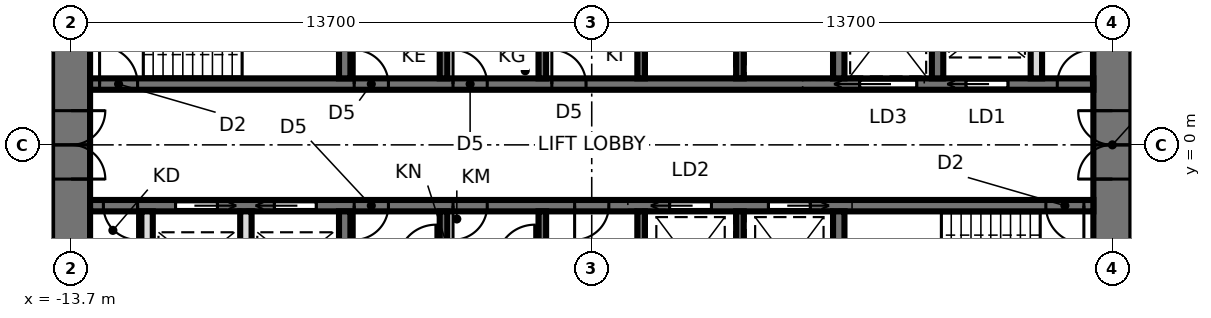
"""IFC4 building model, lengths in metres.
Left out: names, types, materials, properties, quantities, classifications, styles, units other than length and angle.
Written with IfcOpenShell. Run it as: python <this file> out.ifc"""

import sys

from ifc_helpers import new_model, si_unit, direction, frame, frame_2d, origin, place, context, subcontext, project, spatial, rectangle, extrude, element, fill, save


model = new_model("IFC4")
c1 = context("Model", 3, precision=1e-05, world=origin(), true_north=direction((0.0, 1.0)))
c2 = subcontext(c1, "Body", "Model", "MODEL_VIEW")
j1 = project(units=[si_unit("LENGTHUNIT", "METRE"), si_unit("PLANEANGLEUNIT", "RADIAN")], contexts=[c1])
p1 = place(None, origin())
s1 = spatial("IfcSite", under=j1, at=p1, CompositionType="ELEMENT")
p2 = place(p1, origin())
s2 = spatial("IfcBuilding", under=s1, at=p2, CompositionType="ELEMENT")
p3 = place(p2, frame((0.0, 0.0, 207.2)))
s3 = spatial("IfcBuildingStorey", under=s2, at=p3, CompositionType="ELEMENT", Elevation=207.2)
p4 = place(p3, frame((13.7, -9.5, 0.0), z_axis=(0.0, 0.0, 1.0), x_axis=(0.0, 1.0, 0.0)))
e1 = element("IfcWall", 1, at=p4, inside=s3, PredefinedType="SHEAR", context=c2, shape_type="SweptSolid", body=[
    extrude(rectangle(XDim=19.0, YDim=1.0, at=frame_2d((9.5, 0.0))), origin(), (0.0, 0.0, 1.0), 3.9),
])
p5 = place(p4, frame((8.6, 0.0, 0.0)))
e2 = element("IfcOpeningElement", 2, at=p5, cuts=e1, PredefinedType="OPENING", context=c2, shape_type="SweptSolid", body=[
    extrude(rectangle(XDim=1.8, YDim=2.4, at=frame_2d((0.9, 1.2))), frame((0.0, 0.51, 0.0), z_axis=(0.0, -1.0, 0.0), x_axis=(1.0, 0.0, 0.0)), (0.0, 0.0, 1.0), 1.02),
])
p6 = place(p3, frame((-13.7, 9.5, 0.0), z_axis=(0.0, 0.0, 1.0), x_axis=(0.0, -1.0, 0.0)))
e3 = element("IfcWall", 3, at=p6, inside=s3, PredefinedType="SHEAR", context=c2, shape_type="SweptSolid", body=[
    extrude(rectangle(XDim=19.0, YDim=1.0, at=frame_2d((9.5, 0.0))), origin(), (0.0, 0.0, 1.0), 3.9),
])
p7 = place(p6, frame((8.6, 0.0, 0.0)))
e4 = element("IfcOpeningElement", 4, at=p7, cuts=e3, PredefinedType="OPENING", context=c2, shape_type="SweptSolid", body=[
    extrude(rectangle(XDim=1.8, YDim=2.4, at=frame_2d((0.9, 1.2))), frame((0.0, 0.51, 0.0), z_axis=(0.0, -1.0, 0.0), x_axis=(1.0, 0.0, 0.0)), (0.0, 0.0, 1.0), 1.02),
])
p8 = place(p3, frame((-13.2, 1.6, 0.0), z_axis=(0.0, 0.0, 1.0), x_axis=(1.0, 0.0, 0.0)))
e5 = element("IfcWall", 5, at=p8, inside=s3, PredefinedType="SHEAR", context=c2, shape_type="SweptSolid", body=[
    extrude(rectangle(XDim=26.4, YDim=0.3, at=frame_2d((13.2, 0.0))), origin(), (0.0, 0.0, 1.0), 3.9),
])
p9 = place(p8, frame((0.25, 0.0, 0.0)))
e6 = element("IfcOpeningElement", 6, at=p9, cuts=e5, PredefinedType="OPENING", context=c2, shape_type="SweptSolid", body=[
    extrude(rectangle(XDim=1.0, YDim=2.1, at=frame_2d((0.5, 1.05))), frame((0.0, 0.16, 0.0), z_axis=(0.0, -1.0, 0.0), x_axis=(1.0, 0.0, 0.0)), (0.0, 0.0, 1.0), 0.32),
])
p10 = place(p8, frame((23.05, 0.0, 0.0)))
e7 = element("IfcOpeningElement", 7, at=p10, cuts=e5, PredefinedType="OPENING", context=c2, shape_type="SweptSolid", body=[
    extrude(rectangle(XDim=1.1, YDim=2.3, at=frame_2d((0.55, 1.15))), frame((0.0, 0.16, 0.0), z_axis=(0.0, -1.0, 0.0), x_axis=(1.0, 0.0, 0.0)), (0.0, 0.0, 1.0), 0.32),
])
p11 = place(p8, frame((20.25, 0.0, 0.0)))
e8 = element("IfcOpeningElement", 8, at=p11, cuts=e5, PredefinedType="OPENING", context=c2, shape_type="SweptSolid", body=[
    extrude(rectangle(XDim=1.5, YDim=2.4, at=frame_2d((0.75, 1.2))), frame((0.0, 0.16, 0.0), z_axis=(0.0, -1.0, 0.0), x_axis=(1.0, 0.0, 0.0)), (0.0, 0.0, 1.0), 0.32),
])
p12 = place(p8, frame((6.95, 0.0, 0.0)))
e9 = element("IfcOpeningElement", 9, at=p12, cuts=e5, PredefinedType="OPENING", context=c2, shape_type="SweptSolid", body=[
    extrude(rectangle(XDim=0.9, YDim=2.1, at=frame_2d((0.45, 1.05))), frame((0.0, 0.16, 0.0), z_axis=(0.0, -1.0, 0.0), x_axis=(1.0, 0.0, 0.0)), (0.0, 0.0, 1.0), 0.32),
])
p13 = place(p8, frame((9.55, 0.0, 0.0)))
e10 = element("IfcOpeningElement", 10, at=p13, cuts=e5, PredefinedType="OPENING", context=c2, shape_type="SweptSolid", body=[
    extrude(rectangle(XDim=0.9, YDim=2.1, at=frame_2d((0.45, 1.05))), frame((0.0, 0.16, 0.0), z_axis=(0.0, -1.0, 0.0), x_axis=(1.0, 0.0, 0.0)), (0.0, 0.0, 1.0), 0.32),
])
p14 = place(p8, frame((12.15, 0.0, 0.0)))
e11 = element("IfcOpeningElement", 11, at=p14, cuts=e5, PredefinedType="OPENING", context=c2, shape_type="SweptSolid", body=[
    extrude(rectangle(XDim=0.9, YDim=2.1, at=frame_2d((0.45, 1.05))), frame((0.0, 0.16, 0.0), z_axis=(0.0, -1.0, 0.0), x_axis=(1.0, 0.0, 0.0)), (0.0, 0.0, 1.0), 0.32),
])
p15 = place(p8, frame((25.45, 0.0, 0.0)))
e12 = element("IfcOpeningElement", 12, at=p15, cuts=e5, PredefinedType="OPENING", context=c2, shape_type="SweptSolid", body=[
    extrude(rectangle(XDim=0.9, YDim=2.1, at=frame_2d((0.45, 1.05))), frame((0.0, 0.16, 0.0), z_axis=(0.0, -1.0, 0.0), x_axis=(1.0, 0.0, 0.0)), (0.0, 0.0, 1.0), 0.32),
])
p16 = place(p3, frame((-13.2, -1.6, 0.0), z_axis=(0.0, 0.0, 1.0), x_axis=(1.0, 0.0, 0.0)))
e13 = element("IfcWall", 13, at=p16, inside=s3, PredefinedType="SHEAR", context=c2, shape_type="SweptSolid", body=[
    extrude(rectangle(XDim=26.4, YDim=0.3, at=frame_2d((13.2, 0.0))), origin(), (0.0, 0.0, 1.0), 3.9),
])
p17 = place(p16, frame((25.15, 0.0, 0.0)))
e14 = element("IfcOpeningElement", 14, at=p17, cuts=e13, PredefinedType="OPENING", context=c2, shape_type="SweptSolid", body=[
    extrude(rectangle(XDim=1.0, YDim=2.1, at=frame_2d((0.5, 1.05))), frame((0.0, 0.16, 0.0), z_axis=(0.0, -1.0, 0.0), x_axis=(1.0, 0.0, 0.0)), (0.0, 0.0, 1.0), 0.32),
])
p18 = place(p16, frame((6.95, 0.0, 0.0)))
e15 = element("IfcOpeningElement", 15, at=p18, cuts=e13, PredefinedType="OPENING", context=c2, shape_type="SweptSolid", body=[
    extrude(rectangle(XDim=0.9, YDim=2.1, at=frame_2d((0.45, 1.05))), frame((0.0, 0.16, 0.0), z_axis=(0.0, -1.0, 0.0), x_axis=(1.0, 0.0, 0.0)), (0.0, 0.0, 1.0), 0.32),
])
p19 = place(p16, frame((9.55, 0.0, 0.0)))
e16 = element("IfcOpeningElement", 16, at=p19, cuts=e13, PredefinedType="OPENING", context=c2, shape_type="SweptSolid", body=[
    extrude(rectangle(XDim=0.9, YDim=2.1, at=frame_2d((0.45, 1.05))), frame((0.0, 0.16, 0.0), z_axis=(0.0, -1.0, 0.0), x_axis=(1.0, 0.0, 0.0)), (0.0, 0.0, 1.0), 0.32),
])
p20 = place(p16, frame((12.75, 0.0, 0.0)))
e17 = element("IfcOpeningElement", 17, at=p20, cuts=e13, PredefinedType="OPENING", context=c2, shape_type="SweptSolid", body=[
    extrude(rectangle(XDim=0.9, YDim=2.1, at=frame_2d((0.45, 1.05))), frame((0.0, 0.16, 0.0), z_axis=(0.0, -1.0, 0.0), x_axis=(1.0, 0.0, 0.0)), (0.0, 0.0, 1.0), 0.32),
])
p21 = place(p16, frame((15.25, 0.0, 0.0)))
e18 = element("IfcOpeningElement", 18, at=p21, cuts=e13, PredefinedType="OPENING", context=c2, shape_type="SweptSolid", body=[
    extrude(rectangle(XDim=1.1, YDim=2.3, at=frame_2d((0.55, 1.15))), frame((0.0, 0.16, 0.0), z_axis=(0.0, -1.0, 0.0), x_axis=(1.0, 0.0, 0.0)), (0.0, 0.0, 1.0), 0.32),
])
p22 = place(p16, frame((17.85, 0.0, 0.0)))
e19 = element("IfcOpeningElement", 19, at=p22, cuts=e13, PredefinedType="OPENING", context=c2, shape_type="SweptSolid", body=[
    extrude(rectangle(XDim=1.1, YDim=2.3, at=frame_2d((0.55, 1.15))), frame((0.0, 0.16, 0.0), z_axis=(0.0, -1.0, 0.0), x_axis=(1.0, 0.0, 0.0)), (0.0, 0.0, 1.0), 0.32),
])
p23 = place(p16, frame((4.85, 0.0, 0.0)))
e20 = element("IfcOpeningElement", 20, at=p23, cuts=e13, PredefinedType="OPENING", context=c2, shape_type="SweptSolid", body=[
    extrude(rectangle(XDim=1.1, YDim=2.3, at=frame_2d((0.55, 1.15))), frame((0.0, 0.16, 0.0), z_axis=(0.0, -1.0, 0.0), x_axis=(1.0, 0.0, 0.0)), (0.0, 0.0, 1.0), 0.32),
])
p24 = place(p16, frame((2.25, 0.0, 0.0)))
e21 = element("IfcOpeningElement", 21, at=p24, cuts=e13, PredefinedType="OPENING", context=c2, shape_type="SweptSolid", body=[
    extrude(rectangle(XDim=1.1, YDim=2.3, at=frame_2d((0.55, 1.15))), frame((0.0, 0.16, 0.0), z_axis=(0.0, -1.0, 0.0), x_axis=(1.0, 0.0, 0.0)), (0.0, 0.0, 1.0), 0.32),
])
p25 = place(p16, frame((0.35, 0.0, 0.0)))
e22 = element("IfcOpeningElement", 22, at=p25, cuts=e13, PredefinedType="OPENING", context=c2, shape_type="SweptSolid", body=[
    extrude(rectangle(XDim=0.9, YDim=2.1, at=frame_2d((0.45, 1.05))), frame((0.0, 0.16, 0.0), z_axis=(0.0, -1.0, 0.0), x_axis=(1.0, 0.0, 0.0)), (0.0, 0.0, 1.0), 0.32),
])
for number, where, z_axis, x_axis in (
    (23, (-6.5, 1.75, 0.0), (0.0, 0.0, 1.0), (0.0, 1.0, 0.0)),
    (24, (6.5, 1.75, 0.0), (0.0, 0.0, 1.0), (0.0, 1.0, 0.0)),
):
    element("IfcWall", number, at=place(p3, frame(where, z_axis=z_axis, x_axis=x_axis)), inside=s3, PredefinedType="SHEAR", context=c2, shape_type="SweptSolid", body=[
        extrude(rectangle(XDim=2.7, YDim=0.3, at=frame_2d((1.35, 0.0))), origin(), (0.0, 0.0, 1.0), 3.9),
    ])
for number, where, z_axis, x_axis in (
    (25, (-3.9, 1.75, 0.0), (0.0, 0.0, 1.0), (0.0, 1.0, 0.0)),
    (26, (-1.3, 1.75, 0.0), (0.0, 0.0, 1.0), (0.0, 1.0, 0.0)),
    (27, (1.3, 1.75, 0.0), (0.0, 0.0, 1.0), (0.0, 1.0, 0.0)),
    (28, (3.9, 1.75, 0.0), (0.0, 0.0, 1.0), (0.0, 1.0, 0.0)),
):
    element("IfcWall", number, at=place(p3, frame(where, z_axis=z_axis, x_axis=x_axis)), inside=s3, PredefinedType="SHEAR", context=c2, shape_type="SweptSolid", body=[
        extrude(rectangle(XDim=2.7, YDim=0.2, at=frame_2d((1.35, 0.0))), origin(), (0.0, 0.0, 1.0), 3.9),
    ])
for number, where, z_axis, x_axis in (
    (29, (-6.5, -1.75, 0.0), (0.0, 0.0, 1.0), (0.0, -1.0, 0.0)),
    (30, (6.5, -1.75, 0.0), (0.0, 0.0, 1.0), (0.0, -1.0, 0.0)),
):
    element("IfcWall", number, at=place(p3, frame(where, z_axis=z_axis, x_axis=x_axis)), inside=s3, PredefinedType="SHEAR", context=c2, shape_type="SweptSolid", body=[
        extrude(rectangle(XDim=2.7, YDim=0.3, at=frame_2d((1.35, 0.0))), origin(), (0.0, 0.0, 1.0), 3.9),
    ])
for number, where, z_axis, x_axis in (
    (31, (-3.9, -1.75, 0.0), (0.0, 0.0, 1.0), (0.0, -1.0, 0.0)),
    (32, (-1.3, -1.75, 0.0), (0.0, 0.0, 1.0), (0.0, -1.0, 0.0)),
    (33, (1.3, -1.75, 0.0), (0.0, 0.0, 1.0), (0.0, -1.0, 0.0)),
    (34, (3.9, -1.75, 0.0), (0.0, 0.0, 1.0), (0.0, -1.0, 0.0)),
):
    element("IfcWall", number, at=place(p3, frame(where, z_axis=z_axis, x_axis=x_axis)), inside=s3, PredefinedType="SHEAR", context=c2, shape_type="SweptSolid", body=[
        extrude(rectangle(XDim=2.7, YDim=0.2, at=frame_2d((1.35, 0.0))), origin(), (0.0, 0.0, 1.0), 3.9),
    ])
p26 = place(p3, frame((9.1, 1.75, 0.0), z_axis=(0.0, 0.0, 1.0), x_axis=(0.0, 1.0, 0.0)))
e35 = element("IfcWall", 35, at=p26, inside=s3, PredefinedType="SHEAR", context=c2, shape_type="SweptSolid", body=[
    extrude(rectangle(XDim=2.7, YDim=0.3, at=frame_2d((1.35, 0.0))), origin(), (0.0, 0.0, 1.0), 3.9),
])
for number, where, z_axis, x_axis in (
    (36, (-9.1, -1.75, 0.0), (0.0, 0.0, 1.0), (0.0, -1.0, 0.0)),
    (37, (-11.7, -1.75, 0.0), (0.0, 0.0, 1.0), (0.0, -1.0, 0.0)),
    (38, (11.7, 1.75, 0.0), (0.0, 0.0, 1.0), (0.0, 1.0, 0.0)),
):
    element("IfcWall", number, at=place(p3, frame(where, z_axis=z_axis, x_axis=x_axis)), inside=s3, PredefinedType="SOLIDWALL", context=c2, shape_type="SweptSolid", body=[
        extrude(rectangle(XDim=2.7, YDim=0.3, at=frame_2d((1.35, 0.0))), origin(), (0.0, 0.0, 1.0), 3.74),
    ])
p27 = place(p7, origin())
e39 = element("IfcDoor", 39, at=p27, inside=s3, OperationType="DOUBLE_DOOR_SINGLE_SWING", PredefinedType="DOOR", context=c2, shape_type="SweptSolid", body=[
    extrude(rectangle(XDim=1.72, YDim=2.36, at=frame_2d((0.9, 1.18))), frame((0.0, 0.025, 0.0), z_axis=(0.0, -1.0, 0.0), x_axis=(1.0, 0.0, 0.0)), (0.0, 0.0, 1.0), 0.05),
    extrude(rectangle(XDim=0.04, YDim=2.4, at=frame_2d((0.02, 1.2))), frame((0.0, 0.25, 0.0), z_axis=(0.0, -1.0, 0.0), x_axis=(1.0, 0.0, 0.0)), (0.0, 0.0, 1.0), 0.5),
    extrude(rectangle(XDim=0.04, YDim=2.4, at=frame_2d((1.78, 1.2))), frame((0.0, 0.25, 0.0), z_axis=(0.0, -1.0, 0.0), x_axis=(1.0, 0.0, 0.0)), (0.0, 0.0, 1.0), 0.5),
    extrude(rectangle(XDim=1.72, YDim=0.04, at=frame_2d((0.9, 2.38))), frame((0.0, 0.25, 0.0), z_axis=(0.0, -1.0, 0.0), x_axis=(1.0, 0.0, 0.0)), (0.0, 0.0, 1.0), 0.5),
])
fill(e4, e39)
p28 = place(p5, origin())
e40 = element("IfcDoor", 40, at=p28, inside=s3, OperationType="DOUBLE_DOOR_SINGLE_SWING", PredefinedType="DOOR", context=c2, shape_type="SweptSolid", body=[
    extrude(rectangle(XDim=1.72, YDim=2.36, at=frame_2d((0.9, 1.18))), frame((0.0, 0.025, 0.0), z_axis=(0.0, -1.0, 0.0), x_axis=(1.0, 0.0, 0.0)), (0.0, 0.0, 1.0), 0.05),
    extrude(rectangle(XDim=0.04, YDim=2.4, at=frame_2d((0.02, 1.2))), frame((0.0, 0.25, 0.0), z_axis=(0.0, -1.0, 0.0), x_axis=(1.0, 0.0, 0.0)), (0.0, 0.0, 1.0), 0.5),
    extrude(rectangle(XDim=0.04, YDim=2.4, at=frame_2d((1.78, 1.2))), frame((0.0, 0.25, 0.0), z_axis=(0.0, -1.0, 0.0), x_axis=(1.0, 0.0, 0.0)), (0.0, 0.0, 1.0), 0.5),
    extrude(rectangle(XDim=1.72, YDim=0.04, at=frame_2d((0.9, 2.38))), frame((0.0, 0.25, 0.0), z_axis=(0.0, -1.0, 0.0), x_axis=(1.0, 0.0, 0.0)), (0.0, 0.0, 1.0), 0.5),
])
fill(e2, e40)
p29 = place(p9, origin())
e41 = element("IfcDoor", 41, at=p29, inside=s3, OperationType="SINGLE_SWING_LEFT", PredefinedType="DOOR", context=c2, shape_type="SweptSolid", body=[
    extrude(rectangle(XDim=1.0, YDim=2.1, at=frame_2d((0.5, 1.05))), frame((0.0, 0.025, 0.0), z_axis=(0.0, -1.0, 0.0), x_axis=(1.0, 0.0, 0.0)), (0.0, 0.0, 1.0), 0.05),
])
fill(e6, e41)
p30 = place(p17, frame((1.0, 0.0, 0.0), z_axis=(0.0, 0.0, 1.0), x_axis=(-1.0, 0.0, 0.0)))
e42 = element("IfcDoor", 42, at=p30, inside=s3, OperationType="SINGLE_SWING_LEFT", PredefinedType="DOOR", context=c2, shape_type="SweptSolid", body=[
    extrude(rectangle(XDim=1.0, YDim=2.1, at=frame_2d((0.5, 1.05))), frame((0.0, 0.025, 0.0), z_axis=(0.0, -1.0, 0.0), x_axis=(1.0, 0.0, 0.0)), (0.0, 0.0, 1.0), 0.05),
])
fill(e14, e42)
p31 = place(p10, origin())
e43 = element("IfcDoor", 43, at=p31, inside=s3, OperationType="SLIDING_TO_LEFT", PredefinedType="DOOR", context=c2, shape_type="SweptSolid", body=[
    extrude(rectangle(XDim=1.1, YDim=2.3, at=frame_2d((0.55, 1.15))), frame((0.0, 0.025, 0.0), z_axis=(0.0, -1.0, 0.0), x_axis=(1.0, 0.0, 0.0)), (0.0, 0.0, 1.0), 0.05),
])
fill(e7, e43)
p32 = place(p11, origin())
e44 = element("IfcDoor", 44, at=p32, inside=s3, OperationType="SLIDING_TO_LEFT", PredefinedType="DOOR", context=c2, shape_type="SweptSolid", body=[
    extrude(rectangle(XDim=1.5, YDim=2.4, at=frame_2d((0.75, 1.2))), frame((0.0, 0.025, 0.0), z_axis=(0.0, -1.0, 0.0), x_axis=(1.0, 0.0, 0.0)), (0.0, 0.0, 1.0), 0.05),
])
fill(e8, e44)
p33 = place(p12, origin())
e45 = element("IfcDoor", 45, at=p33, inside=s3, OperationType="SINGLE_SWING_LEFT", PredefinedType="DOOR", context=c2, shape_type="SweptSolid", body=[
    extrude(rectangle(XDim=0.9, YDim=2.1, at=frame_2d((0.45, 1.05))), frame((0.0, 0.025, 0.0), z_axis=(0.0, -1.0, 0.0), x_axis=(1.0, 0.0, 0.0)), (0.0, 0.0, 1.0), 0.05),
])
fill(e9, e45)
p34 = place(p13, origin())
e46 = element("IfcDoor", 46, at=p34, inside=s3, OperationType="SINGLE_SWING_LEFT", PredefinedType="DOOR", context=c2, shape_type="SweptSolid", body=[
    extrude(rectangle(XDim=0.9, YDim=2.1, at=frame_2d((0.45, 1.05))), frame((0.0, 0.025, 0.0), z_axis=(0.0, -1.0, 0.0), x_axis=(1.0, 0.0, 0.0)), (0.0, 0.0, 1.0), 0.05),
])
fill(e10, e46)
p35 = place(p14, origin())
e47 = element("IfcDoor", 47, at=p35, inside=s3, OperationType="SINGLE_SWING_LEFT", PredefinedType="DOOR", context=c2, shape_type="SweptSolid", body=[
    extrude(rectangle(XDim=0.9, YDim=2.1, at=frame_2d((0.45, 1.05))), frame((0.0, 0.025, 0.0), z_axis=(0.0, -1.0, 0.0), x_axis=(1.0, 0.0, 0.0)), (0.0, 0.0, 1.0), 0.05),
])
fill(e11, e47)
p36 = place(p18, frame((0.9, 0.0, 0.0), z_axis=(0.0, 0.0, 1.0), x_axis=(-1.0, 0.0, 0.0)))
e48 = element("IfcDoor", 48, at=p36, inside=s3, OperationType="SINGLE_SWING_RIGHT", PredefinedType="DOOR", context=c2, shape_type="SweptSolid", body=[
    extrude(rectangle(XDim=0.9, YDim=2.1, at=frame_2d((0.45, 1.05))), frame((0.0, 0.025, 0.0), z_axis=(0.0, -1.0, 0.0), x_axis=(1.0, 0.0, 0.0)), (0.0, 0.0, 1.0), 0.05),
])
fill(e15, e48)
p37 = place(p19, frame((0.9, 0.0, 0.0), z_axis=(0.0, 0.0, 1.0), x_axis=(-1.0, 0.0, 0.0)))
e49 = element("IfcDoor", 49, at=p37, inside=s3, OperationType="SINGLE_SWING_RIGHT", PredefinedType="DOOR", context=c2, shape_type="SweptSolid", body=[
    extrude(rectangle(XDim=0.9, YDim=2.1, at=frame_2d((0.45, 1.05))), frame((0.0, 0.025, 0.0), z_axis=(0.0, -1.0, 0.0), x_axis=(1.0, 0.0, 0.0)), (0.0, 0.0, 1.0), 0.05),
])
fill(e16, e49)
p38 = place(p20, frame((0.9, 0.0, 0.0), z_axis=(0.0, 0.0, 1.0), x_axis=(-1.0, 0.0, 0.0)))
e50 = element("IfcDoor", 50, at=p38, inside=s3, OperationType="SINGLE_SWING_RIGHT", PredefinedType="DOOR", context=c2, shape_type="SweptSolid", body=[
    extrude(rectangle(XDim=0.9, YDim=2.1, at=frame_2d((0.45, 1.05))), frame((0.0, 0.025, 0.0), z_axis=(0.0, -1.0, 0.0), x_axis=(1.0, 0.0, 0.0)), (0.0, 0.0, 1.0), 0.05),
])
fill(e17, e50)
p39 = place(p21, frame((1.1, 0.0, 0.0), z_axis=(0.0, 0.0, 1.0), x_axis=(-1.0, 0.0, 0.0)))
e51 = element("IfcDoor", 51, at=p39, inside=s3, OperationType="SLIDING_TO_RIGHT", PredefinedType="DOOR", context=c2, shape_type="SweptSolid", body=[
    extrude(rectangle(XDim=1.1, YDim=2.3, at=frame_2d((0.55, 1.15))), frame((0.0, 0.025, 0.0), z_axis=(0.0, -1.0, 0.0), x_axis=(1.0, 0.0, 0.0)), (0.0, 0.0, 1.0), 0.05),
])
fill(e18, e51)
p40 = place(p22, frame((1.1, 0.0, 0.0), z_axis=(0.0, 0.0, 1.0), x_axis=(-1.0, 0.0, 0.0)))
e52 = element("IfcDoor", 52, at=p40, inside=s3, OperationType="SLIDING_TO_LEFT", PredefinedType="DOOR", context=c2, shape_type="SweptSolid", body=[
    extrude(rectangle(XDim=1.1, YDim=2.3, at=frame_2d((0.55, 1.15))), frame((0.0, 0.025, 0.0), z_axis=(0.0, -1.0, 0.0), x_axis=(1.0, 0.0, 0.0)), (0.0, 0.0, 1.0), 0.05),
])
fill(e19, e52)
p41 = place(p23, frame((1.1, 0.0, 0.0), z_axis=(0.0, 0.0, 1.0), x_axis=(-1.0, 0.0, 0.0)))
e53 = element("IfcDoor", 53, at=p41, inside=s3, OperationType="SLIDING_TO_RIGHT", PredefinedType="DOOR", context=c2, shape_type="SweptSolid", body=[
    extrude(rectangle(XDim=1.1, YDim=2.3, at=frame_2d((0.55, 1.15))), frame((0.0, 0.025, 0.0), z_axis=(0.0, -1.0, 0.0), x_axis=(1.0, 0.0, 0.0)), (0.0, 0.0, 1.0), 0.05),
])
fill(e20, e53)
p42 = place(p24, frame((1.1, 0.0, 0.0), z_axis=(0.0, 0.0, 1.0), x_axis=(-1.0, 0.0, 0.0)))
e54 = element("IfcDoor", 54, at=p42, inside=s3, OperationType="SLIDING_TO_LEFT", PredefinedType="DOOR", context=c2, shape_type="SweptSolid", body=[
    extrude(rectangle(XDim=1.1, YDim=2.3, at=frame_2d((0.55, 1.15))), frame((0.0, 0.025, 0.0), z_axis=(0.0, -1.0, 0.0), x_axis=(1.0, 0.0, 0.0)), (0.0, 0.0, 1.0), 0.05),
])
fill(e21, e54)
p43 = place(p15, origin())
e55 = element("IfcDoor", 55, at=p43, inside=s3, OperationType="SINGLE_SWING_RIGHT", PredefinedType="DOOR", context=c2, shape_type="SweptSolid", body=[
    extrude(rectangle(XDim=0.9, YDim=2.1, at=frame_2d((0.45, 1.05))), frame((0.0, 0.025, 0.0), z_axis=(0.0, -1.0, 0.0), x_axis=(1.0, 0.0, 0.0)), (0.0, 0.0, 1.0), 0.05),
])
fill(e12, e55)
p44 = place(p25, frame((0.9, 0.0, 0.0), z_axis=(0.0, 0.0, 1.0), x_axis=(-1.0, 0.0, 0.0)))
e56 = element("IfcDoor", 56, at=p44, inside=s3, OperationType="SINGLE_SWING_LEFT", PredefinedType="DOOR", context=c2, shape_type="SweptSolid", body=[
    extrude(rectangle(XDim=0.9, YDim=2.1, at=frame_2d((0.45, 1.05))), frame((0.0, 0.025, 0.0), z_axis=(0.0, -1.0, 0.0), x_axis=(1.0, 0.0, 0.0)), (0.0, 0.0, 1.0), 0.05),
])
fill(e22, e56)
save(model, sys.argv[1])
